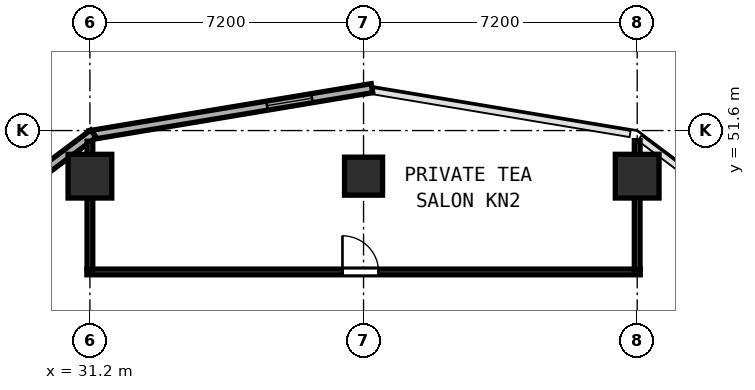
"""IFC4 building model, lengths in metres.
Left out: names, types, materials, properties, quantities, classifications, styles, units other than length and angle.
Written with IfcOpenShell. Run it as: python <this file> out.ifc"""

import sys

from ifc_helpers import new_model, si_unit, direction, frame, frame_2d, origin, origin_2d, place, context, subcontext, project, spatial, rectangle, hollow_rectangle, extrude, element, fill, save


model = new_model("IFC4")
c1 = context("Model", 3, precision=1e-05, world=origin(), true_north=direction((0.0, 1.0)))
c2 = subcontext(c1, "Body", "Model", "MODEL_VIEW")
j1 = project(units=[si_unit("LENGTHUNIT", "METRE"), si_unit("PLANEANGLEUNIT", "RADIAN")], contexts=[c1])
p1 = place(None, origin())
s1 = spatial("IfcSite", under=j1, at=p1, CompositionType="ELEMENT")
p2 = place(p1, origin())
s2 = spatial("IfcBuilding", under=s1, at=p2, CompositionType="ELEMENT")
p3 = place(p2, frame((0.0, 0.0, 62.8)))
s3 = spatial("IfcBuildingStorey", under=s2, at=p3, CompositionType="ELEMENT", Elevation=62.8)
for number, where, z_axis, x_axis in (
    (1, (31.2, 50.4, 0.0), (0.0, 0.0, 1.0), (1.0, 0.0, 0.0)),
    (2, (45.6, 50.4, 0.0), (0.0, 0.0, 1.0), (1.0, 0.0, 0.0)),
):
    element("IfcColumn", number, at=place(p3, frame(where, z_axis=z_axis, x_axis=x_axis)), inside=s3, PredefinedType="COLUMN", context=c2, shape_type="SweptSolid", body=[
        extrude(hollow_rectangle(XDim=1.15, YDim=1.15, WallThickness=0.042, at=origin_2d()), origin(), (0.0, 0.0, 1.0), 3.8),
    ])
p4 = place(p3, frame((38.4, 50.4, 0.0), z_axis=(0.0, 0.0, 1.0), x_axis=(1.0, 0.0, 0.0)))
e3 = element("IfcColumn", 3, at=p4, inside=s3, PredefinedType="COLUMN", context=c2, shape_type="SweptSolid", body=[
    extrude(hollow_rectangle(XDim=1.0, YDim=1.0, WallThickness=0.038, at=origin_2d()), origin(), (0.0, 0.0, 1.0), 3.8),
])
p5 = place(p3, frame((38.622, 52.715, 0.0), z_axis=(0.0, 0.0, 1.0), x_axis=(-0.98639129485, -0.164414760418, 0.0)))
e4 = element("IfcWall", 4, at=p5, inside=s3, PredefinedType="SOLIDWALL", context=c2, shape_type="SweptSolid", body=[
    extrude(rectangle(XDim=7.53, YDim=0.24, at=frame_2d((3.765, 0.0))), origin(), (0.0, 0.0, 1.0), 3.6),
])
p6 = place(p5, frame((1.6, 0.0, 0.85)))
e5 = element("IfcOpeningElement", 5, at=p6, cuts=e4, PredefinedType="OPENING", context=c2, shape_type="SweptSolid", body=[
    extrude(rectangle(XDim=1.2, YDim=1.85, at=frame_2d((0.6, 0.925))), frame((0.0, 0.13, 0.0), z_axis=(0.0, -1.0, 0.0), x_axis=(1.0, 0.0, 0.0)), (0.0, 0.0, 1.0), 0.26),
])
p7 = place(p3, frame((31.292, 51.519, 0.0), z_axis=(0.0, 0.0, 1.0), x_axis=(-0.8, -0.6, 0.0)))
e6 = element("IfcWall", 6, at=p7, inside=s3, PredefinedType="SOLIDWALL", context=c2, shape_type="SweptSolid", body=[
    extrude(rectangle(XDim=6.021, YDim=0.24, at=frame_2d((3.01, 0.0))), origin(), (0.0, 0.0, 1.0), 3.6),
])
p8 = place(p7, frame((1.6, 0.0, 0.85)))
e7 = element("IfcOpeningElement", 7, at=p8, cuts=e6, PredefinedType="OPENING", context=c2, shape_type="SweptSolid", body=[
    extrude(rectangle(XDim=1.2, YDim=1.85, at=frame_2d((0.6, 0.925))), frame((0.0, 0.13, 0.0), z_axis=(0.0, -1.0, 0.0), x_axis=(1.0, 0.0, 0.0)), (0.0, 0.0, 1.0), 0.26),
])
p9 = place(p3, frame((31.12, 47.88, 0.0), z_axis=(0.0, 0.0, 1.0), x_axis=(1.0, 0.0, 0.0)))
e8 = element("IfcWall", 8, at=p9, inside=s3, PredefinedType="PARTITIONING", context=c2, shape_type="SweptSolid", body=[
    extrude(rectangle(XDim=14.56, YDim=0.15, at=frame_2d((7.28, 0.0))), origin(), (0.0, 0.0, 1.0), 3.6),
])
p10 = place(p9, frame((6.725, 0.0, 0.0)))
e9 = element("IfcOpeningElement", 9, at=p10, cuts=e8, PredefinedType="OPENING", context=c2, shape_type="SweptSolid", body=[
    extrude(rectangle(XDim=0.95, YDim=2.12, at=frame_2d((0.475, 1.06))), frame((0.0, 0.085, 0.0), z_axis=(0.0, -1.0, 0.0), x_axis=(1.0, 0.0, 0.0)), (0.0, 0.0, 1.0), 0.17),
])
p11 = place(p3, frame((31.2, 47.94, 0.0), z_axis=(0.0, 0.0, 1.0), x_axis=(0.0, 1.0, 0.0)))
e10 = element("IfcWall", 10, at=p11, inside=s3, PredefinedType="PARTITIONING", context=c2, shape_type="SweptSolid", body=[
    extrude(rectangle(XDim=3.379, YDim=0.15, at=frame_2d((1.689, 0.0))), origin(), (0.0, 0.0, 1.0), 2.985),
])
p12 = place(p3, frame((45.6, 47.94, 0.0), z_axis=(0.0, 0.0, 1.0), x_axis=(0.0, 1.0, 0.0)))
e11 = element("IfcWall", 11, at=p12, inside=s3, PredefinedType="PARTITIONING", context=c2, shape_type="SweptSolid", body=[
    extrude(rectangle(XDim=3.395, YDim=0.15, at=frame_2d((1.698, 0.0))), origin(), (0.0, 0.0, 1.0), 2.985),
])
p13 = place(p6, origin())
e12 = element("IfcWindow", 12, at=p13, inside=s3, PartitioningType="SINGLE_PANEL", PredefinedType="WINDOW", context=c2, shape_type="SweptSolid", body=[
    extrude(rectangle(XDim=1.2, YDim=1.85, at=frame_2d((0.6, 0.925))), frame((0.0, 0.03, 0.0), z_axis=(0.0, -1.0, 0.0), x_axis=(1.0, 0.0, 0.0)), (0.0, 0.0, 1.0), 0.06),
])
fill(e5, e12)
p14 = place(p10, origin())
e13 = element("IfcDoor", 13, at=p14, inside=s3, OperationType="SINGLE_SWING_LEFT", PredefinedType="DOOR", context=c2, shape_type="SweptSolid", body=[
    extrude(rectangle(XDim=0.95, YDim=2.12, at=frame_2d((0.475, 1.06))), frame((0.0, 0.025, 0.0), z_axis=(0.0, -1.0, 0.0), x_axis=(1.0, 0.0, 0.0)), (0.0, 0.0, 1.0), 0.05),
])
fill(e9, e13)
save(model, sys.argv[1])
